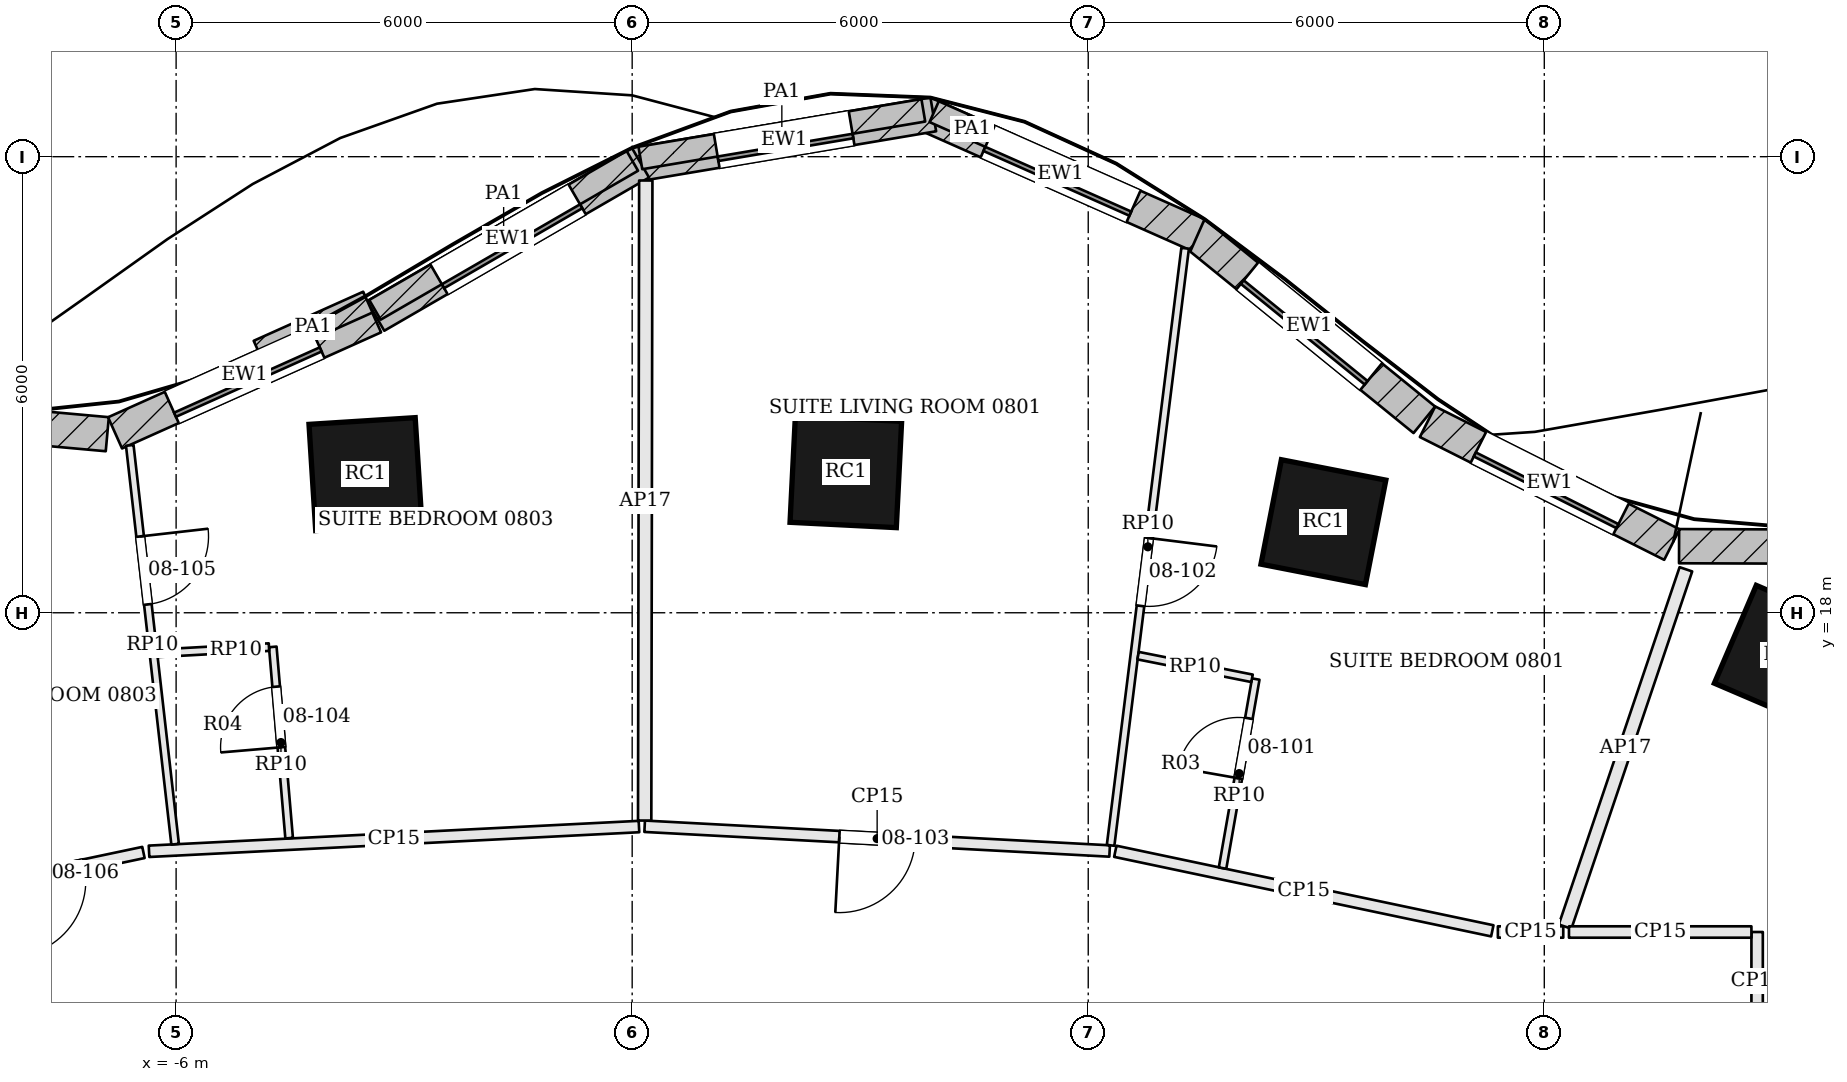
"""IFC4 building model, lengths in metres.
Left out: names, types, materials, properties, quantities, classifications, styles, units other than length and angle.
Written with IfcOpenShell. Run it as: python <this file> out.ifc"""

import sys

from ifc_helpers import new_model, si_unit, direction, frame, frame_2d, origin, origin_2d, place, context, subcontext, project, spatial, rectangle, extrude, element, fill, save


model = new_model("IFC4")
c1 = context("Model", 3, precision=1e-05, world=origin(), true_north=direction((0.0, 1.0)))
c2 = subcontext(c1, "Body", "Model", "MODEL_VIEW")
j1 = project(units=[si_unit("LENGTHUNIT", "METRE"), si_unit("PLANEANGLEUNIT", "RADIAN")], contexts=[c1])
p1 = place(None, origin())
s1 = spatial("IfcSite", under=j1, at=p1, CompositionType="ELEMENT")
p2 = place(p1, origin())
s2 = spatial("IfcBuilding", under=s1, at=p2, CompositionType="ELEMENT")
p3 = place(p2, frame((0.0, 0.0, 44.7)))
s3 = spatial("IfcBuildingStorey", under=s2, at=p3, CompositionType="ELEMENT", Elevation=44.7)
for number, where, z_axis, x_axis in (
    (1, (15.157, 17.441, 0.0), (0.0, 0.0, 1.0), (-0.919, 0.394, 0.0)),
    (2, (9.094, 19.192, 0.0), (0.0, 0.0, 1.0), (-0.981, 0.192, 0.0)),
    (3, (2.811, 19.854, 0.0), (0.0, 0.0, 1.0), (-0.999, 0.05, 0.0)),
    (4, (-3.509, 19.824, 0.0), (0.0, 0.0, 1.0), (-0.998, -0.063, 0.0)),
):
    element("IfcColumn", number, at=place(p3, frame(where, z_axis=z_axis, x_axis=x_axis)), inside=s3, PredefinedType="COLUMN", context=c2, shape_type="SweptSolid", body=[
        extrude(rectangle(XDim=1.4, YDim=1.4, at=origin_2d()), origin(), (0.0, 0.0, 1.0), 3.6),
    ])
p4 = place(p3, frame((19.65, 18.857, 0.0), z_axis=(0.0, 0.0, 1.0), x_axis=(-0.999994750773, 0.003240127552, 0.0)))
e5 = element("IfcWall", 5, at=p4, inside=s3, PredefinedType="SOLIDWALL", context=c2, shape_type="SweptSolid", body=[
    extrude(rectangle(XDim=5.877, YDim=0.45, at=frame_2d((2.938, 0.0))), origin(), (0.0, 0.0, 1.0), 3.4),
])
p5 = place(p4, frame((1.889, 0.0, 0.9)))
e6 = element("IfcOpeningElement", 6, at=p5, cuts=e5, PredefinedType="OPENING", context=c2, shape_type="SweptSolid", body=[
    extrude(rectangle(XDim=2.1, YDim=2.0, at=frame_2d((1.05, 1.0))), frame((0.0, 0.235, 0.0), z_axis=(0.0, -1.0, 0.0), x_axis=(1.0, 0.0, 0.0)), (0.0, 0.0, 1.0), 0.47),
])
p6 = place(p3, frame((13.679, 18.897, 0.0), z_axis=(0.0, 0.0, 1.0), x_axis=(-0.893502471356, 0.449058274259, 0.0)))
e7 = element("IfcWall", 7, at=p6, inside=s3, PredefinedType="SOLIDWALL", context=c2, shape_type="SweptSolid", body=[
    extrude(rectangle(XDim=3.598, YDim=0.45, at=frame_2d((1.799, 0.0))), origin(), (0.0, 0.0, 1.0), 3.4),
])
p7 = place(p6, frame((0.749, 0.0, 0.9)))
e8 = element("IfcOpeningElement", 8, at=p7, cuts=e7, PredefinedType="OPENING", context=c2, shape_type="SweptSolid", body=[
    extrude(rectangle(XDim=2.1, YDim=2.0, at=frame_2d((1.05, 1.0))), frame((0.0, 0.235, 0.0), z_axis=(0.0, -1.0, 0.0), x_axis=(1.0, 0.0, 0.0)), (0.0, 0.0, 1.0), 0.47),
])
p8 = place(p3, frame((10.422, 20.539, 0.0), z_axis=(0.0, 0.0, 1.0), x_axis=(-0.775999170522, 0.63073392754, 0.0)))
e9 = element("IfcWall", 9, at=p8, inside=s3, PredefinedType="SOLIDWALL", context=c2, shape_type="SweptSolid", body=[
    extrude(rectangle(XDim=3.903, YDim=0.45, at=frame_2d((1.951, 0.0))), origin(), (0.0, 0.0, 1.0), 3.4),
])
p9 = place(p8, frame((0.901, 0.0, 0.9)))
e10 = element("IfcOpeningElement", 10, at=p9, cuts=e9, PredefinedType="OPENING", context=c2, shape_type="SweptSolid", body=[
    extrude(rectangle(XDim=2.1, YDim=2.0, at=frame_2d((1.05, 1.0))), frame((0.0, 0.235, 0.0), z_axis=(0.0, -1.0, 0.0), x_axis=(1.0, 0.0, 0.0)), (0.0, 0.0, 1.0), 0.47),
])
p10 = place(p3, frame((7.44, 22.972, 0.0), z_axis=(0.0, 0.0, 1.0), x_axis=(-0.914114918534, 0.405455195692, 0.0)))
e11 = element("IfcWall", 11, at=p10, inside=s3, PredefinedType="SOLIDWALL", context=c2, shape_type="SweptSolid", body=[
    extrude(rectangle(XDim=3.946, YDim=0.45, at=frame_2d((1.973, 0.0))), origin(), (0.0, 0.0, 1.0), 3.4),
])
p11 = place(p10, frame((0.923, 0.0, 0.9)))
e12 = element("IfcOpeningElement", 12, at=p11, cuts=e11, PredefinedType="OPENING", context=c2, shape_type="SweptSolid", body=[
    extrude(rectangle(XDim=2.1, YDim=2.0, at=frame_2d((1.05, 1.0))), frame((0.0, 0.235, 0.0), z_axis=(0.0, -1.0, 0.0), x_axis=(1.0, 0.0, 0.0)), (0.0, 0.0, 1.0), 0.47),
])
p12 = place(p3, frame((3.961, 24.556, 0.0), z_axis=(0.0, 0.0, 1.0), x_axis=(-0.986102211406, -0.166139786505, 0.0)))
e13 = element("IfcWall", 13, at=p12, inside=s3, PredefinedType="SOLIDWALL", context=c2, shape_type="SweptSolid", body=[
    extrude(rectangle(XDim=3.979, YDim=0.45, at=frame_2d((1.99, 0.0))), origin(), (0.0, 0.0, 1.0), 3.4),
])
p13 = place(p12, frame((1.09, 0.0, 0.9)))
e14 = element("IfcOpeningElement", 14, at=p13, cuts=e13, PredefinedType="OPENING", context=c2, shape_type="SweptSolid", body=[
    extrude(rectangle(XDim=1.8, YDim=2.0, at=frame_2d((0.9, 1.0))), frame((0.0, 0.235, 0.0), z_axis=(0.0, -1.0, 0.0), x_axis=(1.0, 0.0, 0.0)), (0.0, 0.0, 1.0), 0.47),
])
p14 = place(p3, frame((0.109, 23.92, 0.0), z_axis=(0.0, 0.0, 1.0), x_axis=(-0.865557769603, -0.500809092848, 0.0)))
e15 = element("IfcWall", 15, at=p14, inside=s3, PredefinedType="SOLIDWALL", context=c2, shape_type="SweptSolid", body=[
    extrude(rectangle(XDim=4.025, YDim=0.45, at=frame_2d((2.012, 0.0))), origin(), (0.0, 0.0, 1.0), 3.4),
])
p15 = place(p14, frame((0.962, 0.0, 0.9)))
e16 = element("IfcOpeningElement", 16, at=p15, cuts=e15, PredefinedType="OPENING", context=c2, shape_type="SweptSolid", body=[
    extrude(rectangle(XDim=2.1, YDim=2.0, at=frame_2d((1.05, 1.0))), frame((0.0, 0.235, 0.0), z_axis=(0.0, -1.0, 0.0), x_axis=(1.0, 0.0, 0.0)), (0.0, 0.0, 1.0), 0.47),
])
p16 = place(p3, frame((-3.395, 21.894, 0.0), z_axis=(0.0, 0.0, 1.0), x_axis=(-0.912496703183, -0.409084058208, 0.0)))
e17 = element("IfcWall", 17, at=p16, inside=s3, PredefinedType="SOLIDWALL", context=c2, shape_type="SweptSolid", body=[
    extrude(rectangle(XDim=3.735, YDim=0.45, at=frame_2d((1.867, 0.0))), origin(), (0.0, 0.0, 1.0), 3.4),
])
p17 = place(p16, frame((0.817, 0.0, 0.9)))
e18 = element("IfcOpeningElement", 18, at=p17, cuts=e17, PredefinedType="OPENING", context=c2, shape_type="SweptSolid", body=[
    extrude(rectangle(XDim=2.1, YDim=2.0, at=frame_2d((1.05, 1.0))), frame((0.0, 0.235, 0.0), z_axis=(0.0, -1.0, 0.0), x_axis=(1.0, 0.0, 0.0)), (0.0, 0.0, 1.0), 0.47),
])
p18 = place(p3, frame((-6.906, 20.349, 0.0), z_axis=(0.0, 0.0, 1.0), x_axis=(-0.995947174038, 0.089940127451, 0.0)))
e19 = element("IfcWall", 19, at=p18, inside=s3, PredefinedType="SOLIDWALL", context=c2, shape_type="SweptSolid", body=[
    extrude(rectangle(XDim=3.844, YDim=0.45, at=frame_2d((1.922, 0.0))), origin(), (0.0, 0.0, 1.0), 3.4),
])
p19 = place(p18, frame((0.872, 0.0, 0.9)))
e20 = element("IfcOpeningElement", 20, at=p19, cuts=e19, PredefinedType="OPENING", context=c2, shape_type="SweptSolid", body=[
    extrude(rectangle(XDim=2.1, YDim=2.0, at=frame_2d((1.05, 1.0))), frame((0.0, 0.235, 0.0), z_axis=(0.0, -1.0, 0.0), x_axis=(1.0, 0.0, 0.0)), (0.0, 0.0, 1.0), 0.47),
])
p20 = place(p3, frame((4.979, 24.146, 3.6), z_axis=(0.0, 0.0, 1.0), x_axis=(-0.91414047558, 0.405397571412, 0.0)))
e21 = element("IfcWall", 21, at=p20, inside=s3, PredefinedType="PARAPET", context=c2, shape_type="SweptSolid", body=[
    extrude(rectangle(XDim=1.101, YDim=0.3, at=frame_2d((0.55, 0.0))), origin(), (0.0, 0.0, 1.0), 1.1),
])
p21 = place(p3, frame((3.83, 24.61, 3.6), z_axis=(0.0, 0.0, 1.0), x_axis=(-0.986111051666, -0.166087307712, 0.0)))
e22 = element("IfcWall", 22, at=p21, inside=s3, PredefinedType="PARAPET", context=c2, shape_type="SweptSolid", body=[
    extrude(rectangle(XDim=3.775, YDim=0.3, at=frame_2d((1.887, 0.0))), origin(), (0.0, 0.0, 1.0), 1.1),
])
p22 = place(p3, frame((0.002, 23.945, 3.6), z_axis=(0.0, 0.0, 1.0), x_axis=(-0.865550152763, -0.500822256945, 0.0)))
e23 = element("IfcWall", 23, at=p22, inside=s3, PredefinedType="PARAPET", context=c2, shape_type="SweptSolid", body=[
    extrude(rectangle(XDim=3.913, YDim=0.3, at=frame_2d((1.956, 0.0))), origin(), (0.0, 0.0, 1.0), 1.1),
])
p23 = place(p3, frame((-3.478, 22.087, 3.6), z_axis=(0.0, 0.0, 1.0), x_axis=(-0.91246752391, -0.409149138835, 0.0)))
e24 = element("IfcWall", 24, at=p23, inside=s3, PredefinedType="PARAPET", context=c2, shape_type="SweptSolid", body=[
    extrude(rectangle(XDim=1.579, YDim=0.3, at=frame_2d((0.79, 0.0))), origin(), (0.0, 0.0, 1.0), 1.1),
])
p24 = place(p3, frame((12.25, 13.8, 0.0), z_axis=(0.0, 0.0, 1.0), x_axis=(-1.0, 0.0, 0.0)))
e25 = element("IfcWall", 25, at=p24, inside=s3, PredefinedType="PARTITIONING", context=c2, shape_type="SweptSolid", body=[
    extrude(rectangle(XDim=0.86, YDim=0.15, at=frame_2d((0.43, 0.0))), origin(), (0.0, 0.0, 1.0), 2.68),
])
p25 = place(p3, frame((11.316, 13.815, 0.0), z_axis=(0.0, 0.0, 1.0), x_axis=(-0.978460774853, 0.206432827025, 0.0)))
e26 = element("IfcWall", 26, at=p25, inside=s3, PredefinedType="PARTITIONING", context=c2, shape_type="SweptSolid", body=[
    extrude(rectangle(XDim=5.069, YDim=0.15, at=frame_2d((2.534, 0.0))), origin(), (0.0, 0.0, 1.0), 2.68),
])
p26 = place(p3, frame((6.281, 14.866, 0.0), z_axis=(0.0, 0.0, 1.0), x_axis=(-0.998587832803, 0.053125701673, 0.0)))
e27 = element("IfcWall", 27, at=p26, inside=s3, PredefinedType="PARTITIONING", context=c2, shape_type="SweptSolid", body=[
    extrude(rectangle(XDim=6.126, YDim=0.15, at=frame_2d((3.063, 0.0))), origin(), (0.0, 0.0, 1.0), 2.68),
])
p27 = place(p26, frame((2.561, 0.0, 0.0)))
e28 = element("IfcOpeningElement", 28, at=p27, cuts=e27, PredefinedType="OPENING", context=c2, shape_type="SweptSolid", body=[
    extrude(rectangle(XDim=1.0, YDim=2.1, at=frame_2d((0.5, 1.05))), frame((0.0, 0.085, 0.0), z_axis=(0.0, -1.0, 0.0), x_axis=(1.0, 0.0, 0.0)), (0.0, 0.0, 1.0), 0.17),
])
p28 = place(p3, frame((13.863, 18.572, 0.0), z_axis=(0.0, 0.0, 1.0), x_axis=(-0.320254541028, -0.947331530643, 0.0)))
e29 = element("IfcWall", 29, at=p28, inside=s3, PredefinedType="PARTITIONING", context=c2, shape_type="SweptSolid", body=[
    extrude(rectangle(XDim=4.962, YDim=0.175, at=frame_2d((2.481, 0.0))), origin(), (0.0, 0.0, 1.0), 2.68),
])
p29 = place(p3, frame((0.179, 23.687, 0.0), z_axis=(0.0, 0.0, 1.0), x_axis=(-0.001768574544, -0.999998436071, 0.0)))
e30 = element("IfcWall", 30, at=p29, inside=s3, PredefinedType="PARTITIONING", context=c2, shape_type="SweptSolid", body=[
    extrude(rectangle(XDim=8.421, YDim=0.175, at=frame_2d((4.21, 0.0))), origin(), (0.0, 0.0, 1.0), 2.68),
])
p30 = place(p3, frame((0.089, 15.188, 0.0), z_axis=(0.0, 0.0, 1.0), x_axis=(-0.998725880164, -0.050464009853, 0.0)))
e31 = element("IfcWall", 31, at=p30, inside=s3, PredefinedType="PARTITIONING", context=c2, shape_type="SweptSolid", body=[
    extrude(rectangle(XDim=6.454, YDim=0.15, at=frame_2d((3.227, 0.0))), origin(), (0.0, 0.0, 1.0), 2.68),
])
p31 = place(p3, frame((-6.43, 14.846, 0.0), z_axis=(0.0, 0.0, 1.0), x_axis=(-0.978469112666, -0.206393303085, 0.0)))
e32 = element("IfcWall", 32, at=p31, inside=s3, PredefinedType="PARTITIONING", context=c2, shape_type="SweptSolid", body=[
    extrude(rectangle(XDim=3.021, YDim=0.15, at=frame_2d((1.51, 0.0))), origin(), (0.0, 0.0, 1.0), 2.68),
])
p32 = place(p31, frame((0.797, 0.0, 0.0)))
e33 = element("IfcOpeningElement", 33, at=p32, cuts=e32, PredefinedType="OPENING", context=c2, shape_type="SweptSolid", body=[
    extrude(rectangle(XDim=1.0, YDim=2.1, at=frame_2d((0.5, 1.05))), frame((0.0, 0.085, 0.0), z_axis=(0.0, -1.0, 0.0), x_axis=(1.0, 0.0, 0.0)), (0.0, 0.0, 1.0), 0.17),
])
p33 = place(p3, frame((14.8, 12.502, 0.0), z_axis=(0.0, 0.0, 1.0), x_axis=(-0.000188040613, 0.99999998232, 0.0)))
e34 = element("IfcWall", 34, at=p33, inside=s3, PredefinedType="PARTITIONING", context=c2, shape_type="SweptSolid", body=[
    extrude(rectangle(XDim=1.298, YDim=0.15, at=frame_2d((0.649, 0.0))), origin(), (0.0, 0.0, 1.0), 2.68),
])
p34 = place(p3, frame((14.725, 13.8, 0.0), z_axis=(0.0, 0.0, 1.0), x_axis=(-1.0, 0.0, 0.0)))
e35 = element("IfcWall", 35, at=p34, inside=s3, PredefinedType="PARTITIONING", context=c2, shape_type="SweptSolid", body=[
    extrude(rectangle(XDim=2.4, YDim=0.15, at=frame_2d((1.2, 0.0))), origin(), (0.0, 0.0, 1.0), 2.68),
])
p35 = place(p3, frame((7.275, 22.795, 0.0), z_axis=(0.0, 0.0, 1.0), x_axis=(-0.123890489741, -0.992295896672, 0.0)))
e36 = element("IfcWall", 36, at=p35, inside=s3, PredefinedType="PARTITIONING", context=c2, shape_type="SweptSolid", body=[
    extrude(rectangle(XDim=7.916, YDim=0.1, at=frame_2d((3.958, 0.0))), origin(), (0.0, 0.0, 1.0), 2.68),
])
p36 = place(p35, frame((3.841, 0.0, 0.0)))
e37 = element("IfcOpeningElement", 37, at=p36, cuts=e36, PredefinedType="OPENING", context=c2, shape_type="SweptSolid", body=[
    extrude(rectangle(XDim=0.9, YDim=2.4, at=frame_2d((0.45, 1.2))), frame((0.0, 0.06, 0.0), z_axis=(0.0, -1.0, 0.0), x_axis=(1.0, 0.0, 0.0)), (0.0, 0.0, 1.0), 0.12),
])
p37 = place(p3, frame((7.767, 14.641, 0.0), z_axis=(0.0, 0.0, 1.0), x_axis=(0.172985442563, 0.984924381189, 0.0)))
e38 = element("IfcWall", 38, at=p37, inside=s3, PredefinedType="PARTITIONING", context=c2, shape_type="SweptSolid", body=[
    extrude(rectangle(XDim=2.525, YDim=0.1, at=frame_2d((1.262, 0.0))), origin(), (0.0, 0.0, 1.0), 2.68),
])
p38 = place(p37, frame((1.2, 0.0, 0.0)))
e39 = element("IfcOpeningElement", 39, at=p38, cuts=e38, PredefinedType="OPENING", context=c2, shape_type="SweptSolid", body=[
    extrude(rectangle(XDim=0.8, YDim=2.1, at=frame_2d((0.4, 1.05))), frame((0.0, 0.06, 0.0), z_axis=(0.0, -1.0, 0.0), x_axis=(1.0, 0.0, 0.0)), (0.0, 0.0, 1.0), 0.12),
])
p39 = place(p3, frame((8.155, 17.137, 0.0), z_axis=(0.0, 0.0, 1.0), x_axis=(-0.980758463285, 0.195225092382, 0.0)))
e40 = element("IfcWall", 40, at=p39, inside=s3, PredefinedType="PARTITIONING", context=c2, shape_type="SweptSolid", body=[
    extrude(rectangle(XDim=1.528, YDim=0.1, at=frame_2d((0.764, 0.0))), origin(), (0.0, 0.0, 1.0), 2.68),
])
p40 = place(p3, frame((-6.61, 20.202, 0.0), z_axis=(0.0, 0.0, 1.0), x_axis=(0.113028971682, -0.993591692578, 0.0)))
e41 = element("IfcWall", 41, at=p40, inside=s3, PredefinedType="PARTITIONING", context=c2, shape_type="SweptSolid", body=[
    extrude(rectangle(XDim=5.281, YDim=0.1, at=frame_2d((2.641, 0.0))), origin(), (0.0, 0.0, 1.0), 2.68),
])
p41 = place(p40, frame((1.206, 0.0, 0.0)))
e42 = element("IfcOpeningElement", 42, at=p41, cuts=e41, PredefinedType="OPENING", context=c2, shape_type="SweptSolid", body=[
    extrude(rectangle(XDim=0.9, YDim=2.4, at=frame_2d((0.45, 1.2))), frame((0.0, 0.06, 0.0), z_axis=(0.0, -1.0, 0.0), x_axis=(1.0, 0.0, 0.0)), (0.0, 0.0, 1.0), 0.12),
])
p42 = place(p3, frame((-4.513, 15.035, 0.0), z_axis=(0.0, 0.0, 1.0), x_axis=(-0.085277735772, 0.996357218964, 0.0)))
e43 = element("IfcWall", 43, at=p42, inside=s3, PredefinedType="PARTITIONING", context=c2, shape_type="SweptSolid", body=[
    extrude(rectangle(XDim=2.525, YDim=0.1, at=frame_2d((1.263, 0.0))), origin(), (0.0, 0.0, 1.0), 2.68),
])
p43 = place(p42, frame((1.2, 0.0, 0.0)))
e44 = element("IfcOpeningElement", 44, at=p43, cuts=e43, PredefinedType="OPENING", context=c2, shape_type="SweptSolid", body=[
    extrude(rectangle(XDim=0.8, YDim=2.1, at=frame_2d((0.4, 1.05))), frame((0.0, 0.06, 0.0), z_axis=(0.0, -1.0, 0.0), x_axis=(1.0, 0.0, 0.0)), (0.0, 0.0, 1.0), 0.12),
])
p44 = place(p3, frame((-4.778, 17.548, 0.0), z_axis=(0.0, 0.0, 1.0), x_axis=(-0.998474099217, -0.055222035383, 0.0)))
e45 = element("IfcWall", 45, at=p44, inside=s3, PredefinedType="PARTITIONING", context=c2, shape_type="SweptSolid", body=[
    extrude(rectangle(XDim=1.472, YDim=0.1, at=frame_2d((0.736, 0.0))), origin(), (0.0, 0.0, 1.0), 2.68),
])
p45 = place(p7, origin())
e46 = element("IfcWindow", 46, at=p45, inside=s3, PartitioningType="SINGLE_PANEL", PredefinedType="WINDOW", context=c2, shape_type="SweptSolid", body=[
    extrude(rectangle(XDim=2.1, YDim=2.0, at=frame_2d((1.05, 1.0))), frame((0.0, 0.135, 0.0), z_axis=(0.0, -1.0, 0.0), x_axis=(1.0, 0.0, 0.0)), (0.0, 0.0, 1.0), 0.06),
])
fill(e8, e46)
p46 = place(p9, origin())
e47 = element("IfcWindow", 47, at=p46, inside=s3, PartitioningType="SINGLE_PANEL", PredefinedType="WINDOW", context=c2, shape_type="SweptSolid", body=[
    extrude(rectangle(XDim=2.1, YDim=2.0, at=frame_2d((1.05, 1.0))), frame((0.0, 0.135, 0.0), z_axis=(0.0, -1.0, 0.0), x_axis=(1.0, 0.0, 0.0)), (0.0, 0.0, 1.0), 0.06),
])
fill(e10, e47)
p47 = place(p11, origin())
e48 = element("IfcWindow", 48, at=p47, inside=s3, PartitioningType="SINGLE_PANEL", PredefinedType="WINDOW", context=c2, shape_type="SweptSolid", body=[
    extrude(rectangle(XDim=2.1, YDim=2.0, at=frame_2d((1.05, 1.0))), frame((0.0, 0.135, 0.0), z_axis=(0.0, -1.0, 0.0), x_axis=(1.0, 0.0, 0.0)), (0.0, 0.0, 1.0), 0.06),
])
fill(e12, e48)
p48 = place(p13, origin())
e49 = element("IfcWindow", 49, at=p48, inside=s3, PartitioningType="SINGLE_PANEL", PredefinedType="WINDOW", context=c2, shape_type="SweptSolid", body=[
    extrude(rectangle(XDim=1.8, YDim=2.0, at=frame_2d((0.9, 1.0))), frame((0.0, 0.135, 0.0), z_axis=(0.0, -1.0, 0.0), x_axis=(1.0, 0.0, 0.0)), (0.0, 0.0, 1.0), 0.06),
])
fill(e14, e49)
p49 = place(p15, origin())
e50 = element("IfcWindow", 50, at=p49, inside=s3, PartitioningType="SINGLE_PANEL", PredefinedType="WINDOW", context=c2, shape_type="SweptSolid", body=[
    extrude(rectangle(XDim=2.1, YDim=2.0, at=frame_2d((1.05, 1.0))), frame((0.0, 0.135, 0.0), z_axis=(0.0, -1.0, 0.0), x_axis=(1.0, 0.0, 0.0)), (0.0, 0.0, 1.0), 0.06),
])
fill(e16, e50)
p50 = place(p17, origin())
e51 = element("IfcWindow", 51, at=p50, inside=s3, PartitioningType="SINGLE_PANEL", PredefinedType="WINDOW", context=c2, shape_type="SweptSolid", body=[
    extrude(rectangle(XDim=2.1, YDim=2.0, at=frame_2d((1.05, 1.0))), frame((0.0, 0.135, 0.0), z_axis=(0.0, -1.0, 0.0), x_axis=(1.0, 0.0, 0.0)), (0.0, 0.0, 1.0), 0.06),
])
fill(e18, e51)
p51 = place(p38, origin())
e52 = element("IfcDoor", 52, at=p51, inside=s3, OperationType="SINGLE_SWING_LEFT", PredefinedType="DOOR", context=c2, shape_type="SweptSolid", body=[
    extrude(rectangle(XDim=0.8, YDim=2.1, at=frame_2d((0.4, 1.05))), frame((0.0, 0.025, 0.0), z_axis=(0.0, -1.0, 0.0), x_axis=(1.0, 0.0, 0.0)), (0.0, 0.0, 1.0), 0.05),
])
fill(e39, e52)
p52 = place(p36, origin())
e53 = element("IfcDoor", 53, at=p52, inside=s3, OperationType="SINGLE_SWING_LEFT", PredefinedType="DOOR", context=c2, shape_type="SweptSolid", body=[
    extrude(rectangle(XDim=0.9, YDim=2.4, at=frame_2d((0.45, 1.2))), frame((0.0, 0.025, 0.0), z_axis=(0.0, -1.0, 0.0), x_axis=(1.0, 0.0, 0.0)), (0.0, 0.0, 1.0), 0.05),
])
fill(e37, e53)
p53 = place(p27, origin())
e54 = element("IfcDoor", 54, at=p53, inside=s3, OperationType="SINGLE_SWING_RIGHT", PredefinedType="DOOR", context=c2, shape_type="SweptSolid", body=[
    extrude(rectangle(XDim=1.0, YDim=2.1, at=frame_2d((0.5, 1.05))), frame((0.0, 0.025, 0.0), z_axis=(0.0, -1.0, 0.0), x_axis=(1.0, 0.0, 0.0)), (0.0, 0.0, 1.0), 0.05),
])
fill(e28, e54)
p54 = place(p43, origin())
e55 = element("IfcDoor", 55, at=p54, inside=s3, OperationType="SINGLE_SWING_LEFT", PredefinedType="DOOR", context=c2, shape_type="SweptSolid", body=[
    extrude(rectangle(XDim=0.8, YDim=2.1, at=frame_2d((0.4, 1.05))), frame((0.0, 0.025, 0.0), z_axis=(0.0, -1.0, 0.0), x_axis=(1.0, 0.0, 0.0)), (0.0, 0.0, 1.0), 0.05),
])
fill(e44, e55)
p55 = place(p41, origin())
e56 = element("IfcDoor", 56, at=p55, inside=s3, OperationType="SINGLE_SWING_LEFT", PredefinedType="DOOR", context=c2, shape_type="SweptSolid", body=[
    extrude(rectangle(XDim=0.9, YDim=2.4, at=frame_2d((0.45, 1.2))), frame((0.0, 0.025, 0.0), z_axis=(0.0, -1.0, 0.0), x_axis=(1.0, 0.0, 0.0)), (0.0, 0.0, 1.0), 0.05),
])
fill(e42, e56)
p56 = place(p32, origin())
e57 = element("IfcDoor", 57, at=p56, inside=s3, OperationType="SINGLE_SWING_RIGHT", PredefinedType="DOOR", context=c2, shape_type="SweptSolid", body=[
    extrude(rectangle(XDim=1.0, YDim=2.1, at=frame_2d((0.5, 1.05))), frame((0.0, 0.025, 0.0), z_axis=(0.0, -1.0, 0.0), x_axis=(1.0, 0.0, 0.0)), (0.0, 0.0, 1.0), 0.05),
])
fill(e33, e57)
save(model, sys.argv[1])
